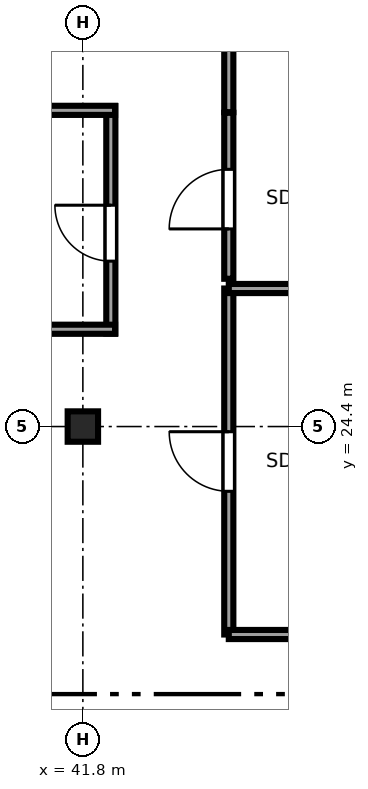
"""IFC4 building model, lengths in metres.
Left out: names, types, materials, properties, quantities, classifications, styles, units other than length and angle.
Written with IfcOpenShell. Run it as: python <this file> out.ifc"""

import sys

from ifc_helpers import new_model, si_unit, direction, frame, frame_2d, origin, origin_2d, place, context, subcontext, project, spatial, rectangle, i_section, extrude, source, transform, mapped, element, fill, save


model = new_model("IFC4")
c1 = context("Model", 3, precision=1e-05, world=origin(), true_north=direction((0.0, 1.0)))
c2 = subcontext(c1, "Body", "Model", "MODEL_VIEW")
j1 = project(units=[si_unit("LENGTHUNIT", "METRE"), si_unit("PLANEANGLEUNIT", "RADIAN")], contexts=[c1])
p1 = place(None, origin())
s1 = spatial("IfcSite", under=j1, at=p1, CompositionType="ELEMENT")
p2 = place(p1, origin())
s2 = spatial("IfcBuilding", under=s1, at=p2, CompositionType="ELEMENT")
p3 = place(p2, frame((0.0, 0.0, 71.05)))
s3 = spatial("IfcBuildingStorey", under=s2, at=p3, CompositionType="ELEMENT", Elevation=71.05)
m1 = source(origin(), c2, "Body", "SweptSolid", [
    extrude(i_section(OverallWidth=0.5, OverallDepth=0.5, WebThickness=0.028, FlangeThickness=0.045, at=origin_2d()), origin(), (0.0, 0.0, 1.0), 3.55),
])
p4 = place(p3, frame((41.8, 24.4, 0.0), z_axis=(0.0, 0.0, 1.0), x_axis=(1.0, 0.0, 0.0)))
e1 = element("IfcColumn", 1, at=p4, inside=s3, PredefinedType="COLUMN", context=c2, shape_type="MappedRepresentation", body=[
    mapped(m1, transform((0.0, 0.0, 0.0), x_axis=(1.0, 0.0, 0.0), y_axis=(0.0, 1.0, 0.0), z_axis=(0.0, 0.0, 1.0), scale=1.0)),
])
p5 = place(p3, frame((44.2, 20.98, 0.0), z_axis=(0.0, 0.0, 1.0), x_axis=(0.0, 1.0, 0.0)))
e2 = element("IfcWall", 2, at=p5, inside=s3, PredefinedType="PARTITIONING", context=c2, shape_type="SweptSolid", body=[
    extrude(rectangle(XDim=5.69, YDim=0.15, at=frame_2d((2.845, 0.0))), origin(), (0.0, 0.0, 1.0), 3.37),
])
p6 = place(p5, frame((2.355, 0.0, 0.0)))
e3 = element("IfcOpeningElement", 3, at=p6, cuts=e2, PredefinedType="OPENING", context=c2, shape_type="SweptSolid", body=[
    extrude(rectangle(XDim=0.98, YDim=2.12, at=frame_2d((0.49, 1.06))), frame((0.0, 0.085, 0.0), z_axis=(0.0, -1.0, 0.0), x_axis=(1.0, 0.0, 0.0)), (0.0, 0.0, 1.0), 0.17),
])
p7 = place(p3, frame((44.2, 20.98, 0.0), z_axis=(0.0, 0.0, 1.0), x_axis=(1.0, 0.0, 0.0)))
e4 = element("IfcWall", 4, at=p7, inside=s3, PredefinedType="PARTITIONING", context=c2, shape_type="SweptSolid", body=[
    extrude(rectangle(XDim=12.395, YDim=0.15, at=frame_2d((6.198, 0.0))), origin(), (0.0, 0.0, 1.0), 3.37),
])
p8 = place(p3, frame((44.2, 26.67, 0.0), z_axis=(0.0, 0.0, 1.0), x_axis=(1.0, 0.0, 0.0)))
e5 = element("IfcWall", 5, at=p8, inside=s3, PredefinedType="PARTITIONING", context=c2, shape_type="SweptSolid", body=[
    extrude(rectangle(XDim=10.03, YDim=0.15, at=frame_2d((5.015, 0.0))), origin(), (0.0, 0.0, 1.0), 3.37),
])
p9 = place(p3, frame((44.2, 26.83, 0.0), z_axis=(0.0, 0.0, 1.0), x_axis=(0.0, 1.0, 0.0)))
e6 = element("IfcWall", 6, at=p9, inside=s3, PredefinedType="PARTITIONING", context=c2, shape_type="SweptSolid", body=[
    extrude(rectangle(XDim=2.73, YDim=0.15, at=frame_2d((1.365, 0.0))), origin(), (0.0, 0.0, 1.0), 3.37),
])
p10 = place(p9, frame((0.82, 0.0, 0.0)))
e7 = element("IfcOpeningElement", 7, at=p10, cuts=e6, PredefinedType="OPENING", context=c2, shape_type="SweptSolid", body=[
    extrude(rectangle(XDim=0.98, YDim=2.12, at=frame_2d((0.49, 1.06))), frame((0.0, 0.085, 0.0), z_axis=(0.0, -1.0, 0.0), x_axis=(1.0, 0.0, 0.0)), (0.0, 0.0, 1.0), 0.17),
])
p11 = place(p3, frame((44.2, 29.57, 0.0), z_axis=(0.0, 0.0, 1.0), x_axis=(0.0, 1.0, 0.0)))
e8 = element("IfcWall", 8, at=p11, inside=s3, PredefinedType="PARTITIONING", context=c2, shape_type="SweptSolid", body=[
    extrude(rectangle(XDim=16.025, YDim=0.15, at=frame_2d((8.012, 0.0))), origin(), (0.0, 0.0, 1.0), 3.37),
])
p12 = place(p3, frame((42.26, 25.93, 0.0), z_axis=(0.0, 0.0, 1.0), x_axis=(0.0, 1.0, 0.0)))
e9 = element("IfcWall", 9, at=p12, inside=s3, PredefinedType="PARTITIONING", context=c2, shape_type="SweptSolid", body=[
    extrude(rectangle(XDim=3.74, YDim=0.15, at=frame_2d((1.87, 0.0))), origin(), (0.0, 0.0, 1.0), 3.37),
])
p13 = place(p12, frame((1.19, 0.0, 0.0)))
e10 = element("IfcOpeningElement", 10, at=p13, cuts=e9, PredefinedType="OPENING", context=c2, shape_type="SweptSolid", body=[
    extrude(rectangle(XDim=0.92, YDim=2.01, at=frame_2d((0.46, 1.005))), frame((0.0, 0.085, 0.0), z_axis=(0.0, -1.0, 0.0), x_axis=(1.0, 0.0, 0.0)), (0.0, 0.0, 1.0), 0.17),
])
for number, where, z_axis, x_axis in (
    (11, (37.93, 26.0, 0.0), (0.0, 0.0, 1.0), (1.0, 0.0, 0.0)),
    (12, (37.93, 29.6, 0.0), (0.0, 0.0, 1.0), (1.0, 0.0, 0.0)),
):
    element("IfcWall", number, at=place(p3, frame(where, z_axis=z_axis, x_axis=x_axis)), inside=s3, PredefinedType="PARTITIONING", context=c2, shape_type="SweptSolid", body=[
        extrude(rectangle(XDim=4.4, YDim=0.15, at=frame_2d((2.2, 0.0))), origin(), (0.0, 0.0, 1.0), 3.37),
    ])
m2 = source(origin(), c2, "Body", "SweptSolid", [
    extrude(rectangle(XDim=0.98, YDim=2.12, at=frame_2d((0.49, 1.06))), frame((0.0, 0.025, 0.0), z_axis=(0.0, -1.0, 0.0), x_axis=(1.0, 0.0, 0.0)), (0.0, 0.0, 1.0), 0.05),
])
p14 = place(p6, origin())
e13 = element("IfcDoor", 13, at=p14, inside=s3, OperationType="SINGLE_SWING_RIGHT", PredefinedType="DOOR", context=c2, shape_type="MappedRepresentation", body=[
    mapped(m2, transform((0.0, 0.0, 0.0), x_axis=(1.0, 0.0, 0.0), y_axis=(0.0, 1.0, 0.0), z_axis=(0.0, 0.0, 1.0), scale=1.0)),
])
fill(e3, e13)
p15 = place(p10, origin())
e14 = element("IfcDoor", 14, at=p15, inside=s3, OperationType="SINGLE_SWING_LEFT", PredefinedType="DOOR", context=c2, shape_type="MappedRepresentation", body=[
    mapped(m2, transform((0.0, 0.0, 0.0), x_axis=(1.0, 0.0, 0.0), y_axis=(0.0, 1.0, 0.0), z_axis=(0.0, 0.0, 1.0), scale=1.0)),
])
fill(e7, e14)
m3 = source(origin(), c2, "Body", "SweptSolid", [
    extrude(rectangle(XDim=0.92, YDim=2.01, at=frame_2d((0.46, 1.005))), frame((0.0, 0.025, 0.0), z_axis=(0.0, -1.0, 0.0), x_axis=(1.0, 0.0, 0.0)), (0.0, 0.0, 1.0), 0.05),
])
p16 = place(p13, origin())
e15 = element("IfcDoor", 15, at=p16, inside=s3, OperationType="SINGLE_SWING_RIGHT", PredefinedType="DOOR", context=c2, shape_type="MappedRepresentation", body=[
    mapped(m3, transform((0.0, 0.0, 0.0), x_axis=(1.0, 0.0, 0.0), y_axis=(0.0, 1.0, 0.0), z_axis=(0.0, 0.0, 1.0), scale=1.0)),
])
fill(e10, e15)
save(model, sys.argv[1])
